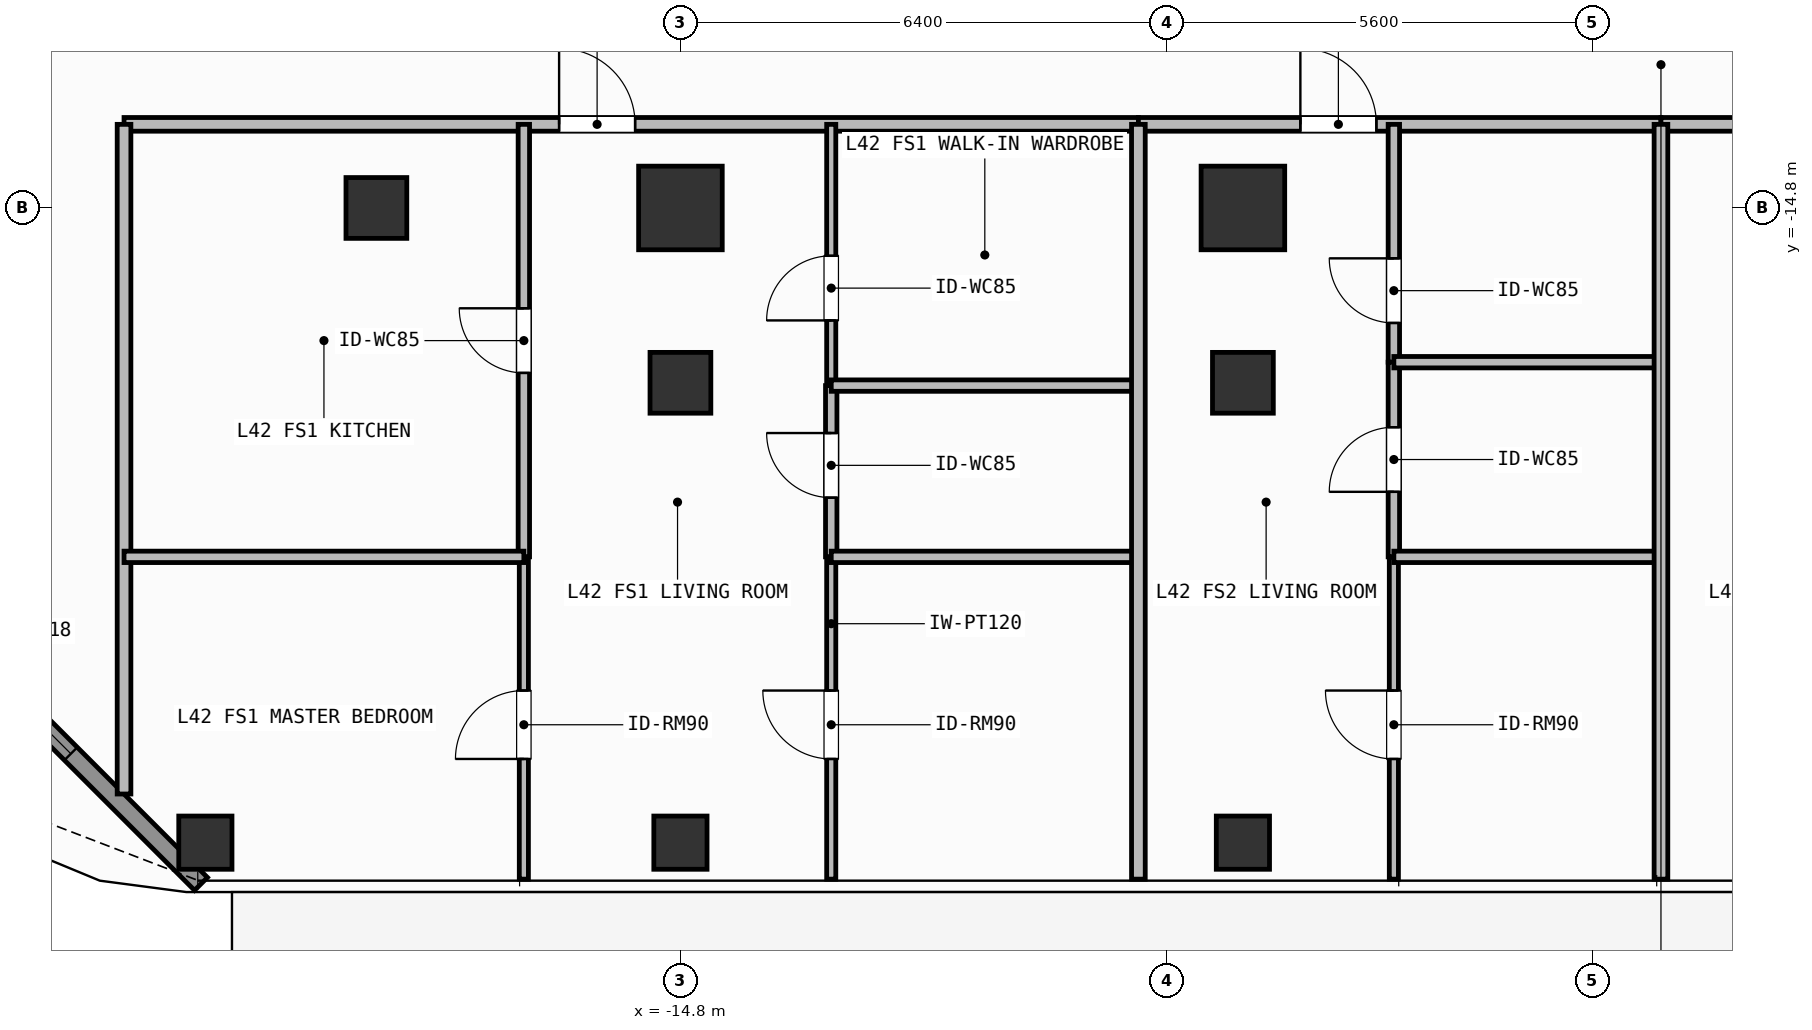
"""IFC4 building model, lengths in metres.
Left out: names, types, materials, properties, quantities, classifications, styles, units other than length and angle.
Written with IfcOpenShell. Run it as: python <this file> out.ifc"""

import sys

from ifc_helpers import new_model, si_unit, direction, frame, frame_2d, origin, origin_2d, place, context, subcontext, project, spatial, rectangle, hollow_rectangle, extrude, element, fill, save


model = new_model("IFC4")
c1 = context("Model", 3, precision=1e-05, world=origin(), true_north=direction((0.0, 1.0)))
c2 = subcontext(c1, "Body", "Model", "MODEL_VIEW")
j1 = project(units=[si_unit("LENGTHUNIT", "METRE"), si_unit("PLANEANGLEUNIT", "RADIAN")], contexts=[c1])
p1 = place(None, origin())
s1 = spatial("IfcSite", under=j1, at=p1, CompositionType="ELEMENT")
p2 = place(p1, origin())
s2 = spatial("IfcBuilding", under=s1, at=p2, CompositionType="ELEMENT")
p3 = place(p2, frame((0.0, 0.0, 171.9)))
s3 = spatial("IfcBuildingStorey", under=s2, at=p3, CompositionType="ELEMENT", Elevation=171.9)
for number, where, z_axis, x_axis in (
    (1, (-14.8, -14.8, 0.0), (0.0, 0.0, 1.0), (1.0, 0.0, 0.0)),
    (2, (-7.4, -14.8, 0.0), (0.0, 0.0, 1.0), (1.0, 0.0, 0.0)),
):
    element("IfcColumn", number, at=place(p3, frame(where, z_axis=z_axis, x_axis=x_axis)), inside=s3, PredefinedType="COLUMN", context=c2, shape_type="SweptSolid", body=[
        extrude(rectangle(XDim=1.1, YDim=1.1, at=origin_2d()), origin(), (0.0, 0.0, 1.0), 3.9),
    ])
for number, where, z_axis, x_axis in (
    (3, (-18.8, -14.8, 0.0), (0.0, 0.0, 1.0), (1.0, 0.0, 0.0)),
    (4, (-14.8, -17.1, 0.0), (0.0, 0.0, 1.0), (1.0, 0.0, 0.0)),
    (5, (-7.4, -17.1, 0.0), (0.0, 0.0, 1.0), (1.0, 0.0, 0.0)),
):
    element("IfcColumn", number, at=place(p3, frame(where, z_axis=z_axis, x_axis=x_axis)), inside=s3, PredefinedType="COLUMN", context=c2, shape_type="SweptSolid", body=[
        extrude(hollow_rectangle(XDim=0.8, YDim=0.8, WallThickness=0.036, at=origin_2d()), origin(), (0.0, 0.0, 1.0), 3.9),
    ])
for number, where, z_axis, x_axis in (
    (6, (-21.05, -23.15, 0.0), (0.0, 0.0, 1.0), (1.0, 0.0, 0.0)),
    (7, (-14.8, -23.15, 0.0), (0.0, 0.0, 1.0), (1.0, 0.0, 0.0)),
    (8, (-7.4, -23.15, 0.0), (0.0, 0.0, 1.0), (1.0, 0.0, 0.0)),
):
    element("IfcColumn", number, at=place(p3, frame(where, z_axis=z_axis, x_axis=x_axis)), inside=s3, PredefinedType="COLUMN", context=c2, shape_type="SweptSolid", body=[
        extrude(hollow_rectangle(XDim=0.7, YDim=0.7, WallThickness=0.032, at=origin_2d()), origin(), (0.0, 0.0, 1.0), 3.9),
    ])
p4 = place(p3, frame((-21.108, -23.692, 0.0), z_axis=(0.0, 0.0, 1.0), x_axis=(-0.707087534163, 0.707126027686, 0.0)))
e9 = element("IfcWall", 9, at=p4, inside=s3, PredefinedType="SOLIDWALL", context=c2, shape_type="SweptSolid", body=[
    extrude(rectangle(XDim=6.342, YDim=0.24, at=frame_2d((3.171, 0.0))), origin(), (0.0, 0.0, 1.0), 3.68),
])
p5 = place(p4, frame((2.421, 0.0, 0.8)))
e10 = element("IfcOpeningElement", 10, at=p5, cuts=e9, PredefinedType="OPENING", context=c2, shape_type="SweptSolid", body=[
    extrude(rectangle(XDim=1.5, YDim=1.85, at=frame_2d((0.75, 0.925))), frame((0.0, 0.13, 0.0), z_axis=(0.0, -1.0, 0.0), x_axis=(1.0, 0.0, 0.0)), (0.0, 0.0, 1.0), 0.26),
])
p6 = place(p3, frame((-22.12, -13.7, 0.0), z_axis=(0.0, 0.0, 1.0), x_axis=(1.0, 0.0, 0.0)))
e11 = element("IfcWall", 11, at=p6, inside=s3, PredefinedType="PARTITIONING", context=c2, shape_type="SweptSolid", body=[
    extrude(rectangle(XDim=13.345, YDim=0.18, at=frame_2d((6.673, 0.0))), origin(), (0.0, 0.0, 1.0), 3.68),
])
p7 = place(p6, frame((5.724, 0.0, 0.0)))
e12 = element("IfcOpeningElement", 12, at=p7, cuts=e11, PredefinedType="OPENING", context=c2, shape_type="SweptSolid", body=[
    extrude(rectangle(XDim=1.0, YDim=2.2, at=frame_2d((0.5, 1.1))), frame((0.0, 0.1, 0.0), z_axis=(0.0, -1.0, 0.0), x_axis=(1.0, 0.0, 0.0)), (0.0, 0.0, 1.0), 0.2),
])
p8 = place(p3, frame((-16.86, -19.39, 0.0), z_axis=(0.0, 0.0, 1.0), x_axis=(0.0, 1.0, 0.0)))
e13 = element("IfcWall", 13, at=p8, inside=s3, PredefinedType="PARTITIONING", context=c2, shape_type="SweptSolid", body=[
    extrude(rectangle(XDim=5.69, YDim=0.15, at=frame_2d((2.845, 0.0))), origin(), (0.0, 0.0, 1.0), 3.68),
])
p9 = place(p8, frame((2.42, 0.0, 0.0)))
e14 = element("IfcOpeningElement", 14, at=p9, cuts=e13, PredefinedType="OPENING", context=c2, shape_type="SweptSolid", body=[
    extrude(rectangle(XDim=0.85, YDim=2.1, at=frame_2d((0.425, 1.05))), frame((0.0, 0.085, 0.0), z_axis=(0.0, -1.0, 0.0), x_axis=(1.0, 0.0, 0.0)), (0.0, 0.0, 1.0), 0.17),
])
p10 = place(p3, frame((-16.86, -23.63, 0.0), z_axis=(0.0, 0.0, 1.0), x_axis=(0.0, 1.0, 0.0)))
e15 = element("IfcWall", 15, at=p10, inside=s3, PredefinedType="PARTITIONING", context=c2, shape_type="SweptSolid", body=[
    extrude(rectangle(XDim=4.24, YDim=0.12, at=frame_2d((2.12, 0.0))), origin(), (0.0, 0.0, 1.0), 3.68),
])
p11 = place(p10, frame((1.581, 0.0, 0.0)))
e16 = element("IfcOpeningElement", 16, at=p11, cuts=e15, PredefinedType="OPENING", context=c2, shape_type="SweptSolid", body=[
    extrude(rectangle(XDim=0.9, YDim=2.1, at=frame_2d((0.45, 1.05))), frame((0.0, 0.07, 0.0), z_axis=(0.0, -1.0, 0.0), x_axis=(1.0, 0.0, 0.0)), (0.0, 0.0, 1.0), 0.14),
])
p12 = place(p3, frame((-12.816, -19.39, 0.0), z_axis=(0.0, 0.0, 1.0), x_axis=(0.0, 1.0, 0.0)))
e17 = element("IfcWall", 17, at=p12, inside=s3, PredefinedType="PARTITIONING", context=c2, shape_type="SweptSolid", body=[
    extrude(rectangle(XDim=2.253, YDim=0.15, at=frame_2d((1.126, 0.0))), origin(), (0.0, 0.0, 1.0), 3.68),
])
p13 = place(p12, frame((0.779, 0.0, 0.0)))
e18 = element("IfcOpeningElement", 18, at=p13, cuts=e17, PredefinedType="OPENING", context=c2, shape_type="SweptSolid", body=[
    extrude(rectangle(XDim=0.85, YDim=2.1, at=frame_2d((0.425, 1.05))), frame((0.0, 0.085, 0.0), z_axis=(0.0, -1.0, 0.0), x_axis=(1.0, 0.0, 0.0)), (0.0, 0.0, 1.0), 0.17),
])
p14 = place(p3, frame((-12.816, -17.137, 0.0), z_axis=(0.0, 0.0, 1.0), x_axis=(0.0, 1.0, 0.0)))
e19 = element("IfcWall", 19, at=p14, inside=s3, PredefinedType="PARTITIONING", context=c2, shape_type="SweptSolid", body=[
    extrude(rectangle(XDim=3.437, YDim=0.12, at=frame_2d((1.719, 0.0))), origin(), (0.0, 0.0, 1.0), 3.68),
])
p15 = place(p14, frame((0.857, 0.0, 0.0)))
e20 = element("IfcOpeningElement", 20, at=p15, cuts=e19, PredefinedType="OPENING", context=c2, shape_type="SweptSolid", body=[
    extrude(rectangle(XDim=0.85, YDim=2.1, at=frame_2d((0.425, 1.05))), frame((0.0, 0.07, 0.0), z_axis=(0.0, -1.0, 0.0), x_axis=(1.0, 0.0, 0.0)), (0.0, 0.0, 1.0), 0.14),
])
p16 = place(p3, frame((-12.816, -23.63, 0.0), z_axis=(0.0, 0.0, 1.0), x_axis=(0.0, 1.0, 0.0)))
e21 = element("IfcWall", 21, at=p16, inside=s3, PredefinedType="PARTITIONING", context=c2, shape_type="SweptSolid", body=[
    extrude(rectangle(XDim=4.24, YDim=0.12, at=frame_2d((2.12, 0.0))), origin(), (0.0, 0.0, 1.0), 3.68),
])
p17 = place(p16, frame((1.581, 0.0, 0.0)))
e22 = element("IfcOpeningElement", 22, at=p17, cuts=e21, PredefinedType="OPENING", context=c2, shape_type="SweptSolid", body=[
    extrude(rectangle(XDim=0.9, YDim=2.1, at=frame_2d((0.45, 1.05))), frame((0.0, 0.07, 0.0), z_axis=(0.0, -1.0, 0.0), x_axis=(1.0, 0.0, 0.0)), (0.0, 0.0, 1.0), 0.14),
])
p18 = place(p3, frame((-8.775, -13.7, 0.0), z_axis=(0.0, 0.0, 1.0), x_axis=(1.0, 0.0, 0.0)))
e23 = element("IfcWall", 23, at=p18, inside=s3, PredefinedType="PARTITIONING", context=c2, shape_type="SweptSolid", body=[
    extrude(rectangle(XDim=6.875, YDim=0.18, at=frame_2d((3.438, 0.0))), origin(), (0.0, 0.0, 1.0), 3.68),
])
p19 = place(p18, frame((2.131, 0.0, 0.0)))
e24 = element("IfcOpeningElement", 24, at=p19, cuts=e23, PredefinedType="OPENING", context=c2, shape_type="SweptSolid", body=[
    extrude(rectangle(XDim=1.0, YDim=2.2, at=frame_2d((0.5, 1.1))), frame((0.0, 0.1, 0.0), z_axis=(0.0, -1.0, 0.0), x_axis=(1.0, 0.0, 0.0)), (0.0, 0.0, 1.0), 0.2),
])
p20 = place(p3, frame((-5.414, -16.829, 0.0), z_axis=(0.0, 0.0, 1.0), x_axis=(0.0, 1.0, 0.0)))
e25 = element("IfcWall", 25, at=p20, inside=s3, PredefinedType="PARTITIONING", context=c2, shape_type="SweptSolid", body=[
    extrude(rectangle(XDim=3.129, YDim=0.15, at=frame_2d((1.564, 0.0))), origin(), (0.0, 0.0, 1.0), 3.68),
])
p21 = place(p20, frame((0.516, 0.0, 0.0)))
e26 = element("IfcOpeningElement", 26, at=p21, cuts=e25, PredefinedType="OPENING", context=c2, shape_type="SweptSolid", body=[
    extrude(rectangle(XDim=0.85, YDim=2.1, at=frame_2d((0.425, 1.05))), frame((0.0, 0.085, 0.0), z_axis=(0.0, -1.0, 0.0), x_axis=(1.0, 0.0, 0.0)), (0.0, 0.0, 1.0), 0.17),
])
p22 = place(p3, frame((-5.414, -19.39, 0.0), z_axis=(0.0, 0.0, 1.0), x_axis=(0.0, 1.0, 0.0)))
e27 = element("IfcWall", 27, at=p22, inside=s3, PredefinedType="PARTITIONING", context=c2, shape_type="SweptSolid", body=[
    extrude(rectangle(XDim=2.561, YDim=0.15, at=frame_2d((1.28, 0.0))), origin(), (0.0, 0.0, 1.0), 3.68),
])
p23 = place(p22, frame((0.855, 0.0, 0.0)))
e28 = element("IfcOpeningElement", 28, at=p23, cuts=e27, PredefinedType="OPENING", context=c2, shape_type="SweptSolid", body=[
    extrude(rectangle(XDim=0.85, YDim=2.1, at=frame_2d((0.425, 1.05))), frame((0.0, 0.085, 0.0), z_axis=(0.0, -1.0, 0.0), x_axis=(1.0, 0.0, 0.0)), (0.0, 0.0, 1.0), 0.17),
])
p24 = place(p3, frame((-5.414, -23.63, 0.0), z_axis=(0.0, 0.0, 1.0), x_axis=(0.0, 1.0, 0.0)))
e29 = element("IfcWall", 29, at=p24, inside=s3, PredefinedType="PARTITIONING", context=c2, shape_type="SweptSolid", body=[
    extrude(rectangle(XDim=4.24, YDim=0.12, at=frame_2d((2.12, 0.0))), origin(), (0.0, 0.0, 1.0), 3.68),
])
p25 = place(p24, frame((1.581, 0.0, 0.0)))
e30 = element("IfcOpeningElement", 30, at=p25, cuts=e29, PredefinedType="OPENING", context=c2, shape_type="SweptSolid", body=[
    extrude(rectangle(XDim=0.9, YDim=2.1, at=frame_2d((0.45, 1.05))), frame((0.0, 0.07, 0.0), z_axis=(0.0, -1.0, 0.0), x_axis=(1.0, 0.0, 0.0)), (0.0, 0.0, 1.0), 0.14),
])
p26 = place(p3, frame((-1.9, -13.7, 0.0), z_axis=(0.0, 0.0, 1.0), x_axis=(1.0, 0.0, 0.0)))
e31 = element("IfcWall", 31, at=p26, inside=s3, PredefinedType="PARTITIONING", context=c2, shape_type="SweptSolid", body=[
    extrude(rectangle(XDim=8.654, YDim=0.18, at=frame_2d((4.327, 0.0))), origin(), (0.0, 0.0, 1.0), 3.68),
])
p27 = place(p26, frame((2.664, 0.0, 0.0)))
e32 = element("IfcOpeningElement", 32, at=p27, cuts=e31, PredefinedType="OPENING", context=c2, shape_type="SweptSolid", body=[
    extrude(rectangle(XDim=1.0, YDim=2.2, at=frame_2d((0.5, 1.1))), frame((0.0, 0.1, 0.0), z_axis=(0.0, -1.0, 0.0), x_axis=(1.0, 0.0, 0.0)), (0.0, 0.0, 1.0), 0.2),
])
p28 = place(p3, frame((-22.12, -22.51, 0.0), z_axis=(0.0, 0.0, 1.0), x_axis=(0.0, 1.0, 0.0)))
e33 = element("IfcWall", 33, at=p28, inside=s3, PredefinedType="PARTITIONING", context=c2, shape_type="SweptSolid", body=[
    extrude(rectangle(XDim=8.81, YDim=0.18, at=frame_2d((4.405, 0.0))), origin(), (0.0, 0.0, 1.0), 3.68),
])
p29 = place(p3, frame((-22.12, -19.39, 0.0), z_axis=(0.0, 0.0, 1.0), x_axis=(1.0, 0.0, 0.0)))
e34 = element("IfcWall", 34, at=p29, inside=s3, PredefinedType="PARTITIONING", context=c2, shape_type="SweptSolid", body=[
    extrude(rectangle(XDim=5.26, YDim=0.15, at=frame_2d((2.63, 0.0))), origin(), (0.0, 0.0, 1.0), 3.68),
])
p30 = place(p3, frame((-12.816, -17.137, 0.0), z_axis=(0.0, 0.0, 1.0), x_axis=(1.0, 0.0, 0.0)))
e35 = element("IfcWall", 35, at=p30, inside=s3, PredefinedType="PARTITIONING", context=c2, shape_type="SweptSolid", body=[
    extrude(rectangle(XDim=4.041, YDim=0.15, at=frame_2d((2.021, 0.0))), origin(), (0.0, 0.0, 1.0), 3.082),
])
p31 = place(p3, frame((-12.816, -19.39, 0.0), z_axis=(0.0, 0.0, 1.0), x_axis=(1.0, 0.0, 0.0)))
e36 = element("IfcWall", 36, at=p31, inside=s3, PredefinedType="PARTITIONING", context=c2, shape_type="SweptSolid", body=[
    extrude(rectangle(XDim=4.041, YDim=0.15, at=frame_2d((2.021, 0.0))), origin(), (0.0, 0.0, 1.0), 3.68),
])
p32 = place(p3, frame((-5.414, -16.829, 0.0), z_axis=(0.0, 0.0, 1.0), x_axis=(1.0, 0.0, 0.0)))
e37 = element("IfcWall", 37, at=p32, inside=s3, PredefinedType="PARTITIONING", context=c2, shape_type="SweptSolid", body=[
    extrude(rectangle(XDim=3.514, YDim=0.15, at=frame_2d((1.757, 0.0))), origin(), (0.0, 0.0, 1.0), 3.082),
])
p33 = place(p3, frame((-5.414, -19.39, 0.0), z_axis=(0.0, 0.0, 1.0), x_axis=(1.0, 0.0, 0.0)))
e38 = element("IfcWall", 38, at=p33, inside=s3, PredefinedType="PARTITIONING", context=c2, shape_type="SweptSolid", body=[
    extrude(rectangle(XDim=3.514, YDim=0.15, at=frame_2d((1.757, 0.0))), origin(), (0.0, 0.0, 1.0), 3.68),
])
for number, where, z_axis, x_axis in (
    (39, (-8.775, -23.63, 0.0), (0.0, 0.0, 1.0), (0.0, 1.0, 0.0)),
    (40, (-1.9, -23.63, 0.0), (0.0, 0.0, 1.0), (0.0, 1.0, 0.0)),
):
    element("IfcWall", number, at=place(p3, frame(where, z_axis=z_axis, x_axis=x_axis)), inside=s3, PredefinedType="PARTITIONING", context=c2, shape_type="SweptSolid", body=[
        extrude(rectangle(XDim=9.93, YDim=0.18, at=frame_2d((4.965, 0.0))), origin(), (0.0, 0.0, 1.0), 3.68),
    ])
p34 = place(p5, origin())
e41 = element("IfcWindow", 41, at=p34, inside=s3, PartitioningType="SINGLE_PANEL", PredefinedType="WINDOW", context=c2, shape_type="SweptSolid", body=[
    extrude(rectangle(XDim=1.5, YDim=1.85, at=frame_2d((0.75, 0.925))), frame((0.0, 0.03, 0.0), z_axis=(0.0, -1.0, 0.0), x_axis=(1.0, 0.0, 0.0)), (0.0, 0.0, 1.0), 0.06),
])
fill(e10, e41)
p35 = place(p7, origin())
e42 = element("IfcDoor", 42, at=p35, inside=s3, OperationType="SINGLE_SWING_LEFT", PredefinedType="DOOR", context=c2, shape_type="SweptSolid", body=[
    extrude(rectangle(XDim=1.0, YDim=2.2, at=frame_2d((0.5, 1.1))), frame((0.0, 0.025, 0.0), z_axis=(0.0, -1.0, 0.0), x_axis=(1.0, 0.0, 0.0)), (0.0, 0.0, 1.0), 0.05),
])
fill(e12, e42)
p36 = place(p9, origin())
e43 = element("IfcDoor", 43, at=p36, inside=s3, OperationType="SINGLE_SWING_RIGHT", PredefinedType="DOOR", context=c2, shape_type="SweptSolid", body=[
    extrude(rectangle(XDim=0.85, YDim=2.1, at=frame_2d((0.425, 1.05))), frame((0.0, 0.025, 0.0), z_axis=(0.0, -1.0, 0.0), x_axis=(1.0, 0.0, 0.0)), (0.0, 0.0, 1.0), 0.05),
])
fill(e14, e43)
p37 = place(p11, origin())
e44 = element("IfcDoor", 44, at=p37, inside=s3, OperationType="SINGLE_SWING_LEFT", PredefinedType="DOOR", context=c2, shape_type="SweptSolid", body=[
    extrude(rectangle(XDim=0.9, YDim=2.1, at=frame_2d((0.45, 1.05))), frame((0.0, 0.025, 0.0), z_axis=(0.0, -1.0, 0.0), x_axis=(1.0, 0.0, 0.0)), (0.0, 0.0, 1.0), 0.05),
])
fill(e16, e44)
p38 = place(p13, origin())
e45 = element("IfcDoor", 45, at=p38, inside=s3, OperationType="SINGLE_SWING_RIGHT", PredefinedType="DOOR", context=c2, shape_type="SweptSolid", body=[
    extrude(rectangle(XDim=0.85, YDim=2.1, at=frame_2d((0.425, 1.05))), frame((0.0, 0.025, 0.0), z_axis=(0.0, -1.0, 0.0), x_axis=(1.0, 0.0, 0.0)), (0.0, 0.0, 1.0), 0.05),
])
fill(e18, e45)
p39 = place(p15, origin())
e46 = element("IfcDoor", 46, at=p39, inside=s3, OperationType="SINGLE_SWING_LEFT", PredefinedType="DOOR", context=c2, shape_type="SweptSolid", body=[
    extrude(rectangle(XDim=0.85, YDim=2.1, at=frame_2d((0.425, 1.05))), frame((0.0, 0.025, 0.0), z_axis=(0.0, -1.0, 0.0), x_axis=(1.0, 0.0, 0.0)), (0.0, 0.0, 1.0), 0.05),
])
fill(e20, e46)
p40 = place(p17, origin())
e47 = element("IfcDoor", 47, at=p40, inside=s3, OperationType="SINGLE_SWING_RIGHT", PredefinedType="DOOR", context=c2, shape_type="SweptSolid", body=[
    extrude(rectangle(XDim=0.9, YDim=2.1, at=frame_2d((0.45, 1.05))), frame((0.0, 0.025, 0.0), z_axis=(0.0, -1.0, 0.0), x_axis=(1.0, 0.0, 0.0)), (0.0, 0.0, 1.0), 0.05),
])
fill(e22, e47)
p41 = place(p19, origin())
e48 = element("IfcDoor", 48, at=p41, inside=s3, OperationType="SINGLE_SWING_LEFT", PredefinedType="DOOR", context=c2, shape_type="SweptSolid", body=[
    extrude(rectangle(XDim=1.0, YDim=2.2, at=frame_2d((0.5, 1.1))), frame((0.0, 0.025, 0.0), z_axis=(0.0, -1.0, 0.0), x_axis=(1.0, 0.0, 0.0)), (0.0, 0.0, 1.0), 0.05),
])
fill(e24, e48)
p42 = place(p21, origin())
e49 = element("IfcDoor", 49, at=p42, inside=s3, OperationType="SINGLE_SWING_RIGHT", PredefinedType="DOOR", context=c2, shape_type="SweptSolid", body=[
    extrude(rectangle(XDim=0.85, YDim=2.1, at=frame_2d((0.425, 1.05))), frame((0.0, 0.025, 0.0), z_axis=(0.0, -1.0, 0.0), x_axis=(1.0, 0.0, 0.0)), (0.0, 0.0, 1.0), 0.05),
])
fill(e26, e49)
p43 = place(p23, origin())
e50 = element("IfcDoor", 50, at=p43, inside=s3, OperationType="SINGLE_SWING_LEFT", PredefinedType="DOOR", context=c2, shape_type="SweptSolid", body=[
    extrude(rectangle(XDim=0.85, YDim=2.1, at=frame_2d((0.425, 1.05))), frame((0.0, 0.025, 0.0), z_axis=(0.0, -1.0, 0.0), x_axis=(1.0, 0.0, 0.0)), (0.0, 0.0, 1.0), 0.05),
])
fill(e28, e50)
p44 = place(p25, origin())
e51 = element("IfcDoor", 51, at=p44, inside=s3, OperationType="SINGLE_SWING_RIGHT", PredefinedType="DOOR", context=c2, shape_type="SweptSolid", body=[
    extrude(rectangle(XDim=0.9, YDim=2.1, at=frame_2d((0.45, 1.05))), frame((0.0, 0.025, 0.0), z_axis=(0.0, -1.0, 0.0), x_axis=(1.0, 0.0, 0.0)), (0.0, 0.0, 1.0), 0.05),
])
fill(e30, e51)
save(model, sys.argv[1])
